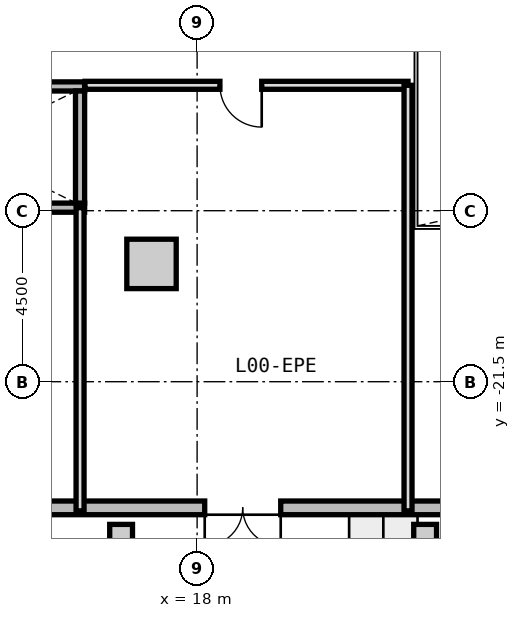
"""IFC4 building model, lengths in metres.
Left out: names, types, materials, properties, quantities, classifications, styles, units other than length and angle.
Written with IfcOpenShell. Run it as: python <this file> out.ifc"""

import sys

from ifc_helpers import new_model, si_unit, direction, frame, frame_2d, origin, origin_2d, place, context, subcontext, project, spatial, rectangle, extrude, source, transform, mapped, element, fill, save


model = new_model("IFC4")
c1 = context("Model", 3, precision=1e-05, world=origin(), true_north=direction((0.0, 1.0)))
c2 = subcontext(c1, "Body", "Model", "MODEL_VIEW")
j1 = project(units=[si_unit("LENGTHUNIT", "METRE"), si_unit("PLANEANGLEUNIT", "RADIAN")], contexts=[c1])
p1 = place(None, origin())
s1 = spatial("IfcSite", under=j1, at=p1, CompositionType="ELEMENT")
p2 = place(p1, origin())
s2 = spatial("IfcBuilding", under=s1, at=p2, CompositionType="ELEMENT")
p3 = place(p2, origin())
s3 = spatial("IfcBuildingStorey", under=s2, at=p3, CompositionType="ELEMENT", Elevation=0.0)
m1 = source(origin(), c2, "Body", "SweptSolid", [
    extrude(rectangle(XDim=1.3, YDim=1.3, at=origin_2d()), origin(), (0.0, 0.0, 1.0), 4.2),
])
p4 = place(p3, frame((16.8, -18.4, 0.0), z_axis=(0.0, 0.0, 1.0), x_axis=(1.0, 0.0, 0.0)))
e1 = element("IfcColumn", 1, at=p4, inside=s3, PredefinedType="COLUMN", context=c2, shape_type="MappedRepresentation", body=[
    mapped(m1, transform((0.0, 0.0, 0.0), x_axis=(1.0, 0.0, 0.0), y_axis=(0.0, 1.0, 0.0), z_axis=(0.0, 0.0, 1.0), scale=1.0)),
])
m2 = source(origin(), c2, "Body", "SweptSolid", [
    extrude(rectangle(XDim=0.6, YDim=0.45, at=origin_2d()), origin(), (0.0, 0.0, 1.0), 4.2),
])
for number, where, z_axis, x_axis in (
    (2, (16.0, -25.48, 0.0), (0.0, 0.0, 1.0), (1.0, 0.0, 0.0)),
    (3, (24.0, -25.48, 0.0), (0.0, 0.0, 1.0), (1.0, 0.0, 0.0)),
):
    element("IfcColumn", number, at=place(p3, frame(where, z_axis=z_axis, x_axis=x_axis)), inside=s3, PredefinedType="PILASTER", context=c2, shape_type="MappedRepresentation", body=[
        mapped(m2, transform((0.0, 0.0, 0.0), x_axis=(1.0, 0.0, 0.0), y_axis=(0.0, 1.0, 0.0), z_axis=(0.0, 0.0, 1.0), scale=1.0)),
    ])
m3 = source(origin(), c2, "Body", "SweptSolid", [
    extrude(rectangle(XDim=108.64, YDim=0.36, at=frame_2d((54.32, 0.0))), origin(), (0.0, 0.0, 1.0), 3.88),
])
p5 = place(p3, frame((54.32, -24.82, 0.0), z_axis=(0.0, 0.0, 1.0), x_axis=(-1.0, 0.0, 0.0)))
e4 = element("IfcWall", 4, at=p5, inside=s3, PredefinedType="SOLIDWALL", context=c2, shape_type="MappedRepresentation", body=[
    mapped(m3, transform((0.0, 0.0, 0.0), x_axis=(1.0, 0.0, 0.0), y_axis=(0.0, 1.0, 0.0), z_axis=(0.0, 0.0, 1.0), scale=1.0)),
])
p6 = place(p5, frame((50.52, 0.0, 0.0)))
e5 = element("IfcOpeningElement", 5, at=p6, cuts=e4, PredefinedType="OPENING", context=c2, shape_type="SweptSolid", body=[
    extrude(rectangle(XDim=2.4, YDim=2.6, at=frame_2d((1.2, 1.3))), frame((0.0, 0.19, 0.0), z_axis=(0.0, -1.0, 0.0), x_axis=(1.0, 0.0, 0.0)), (0.0, 0.0, 1.0), 0.38),
])
p7 = place(p5, frame((57.12, 0.0, 0.0)))
e6 = element("IfcOpeningElement", 6, at=p7, cuts=e4, PredefinedType="OPENING", context=c2, shape_type="SweptSolid", body=[
    extrude(rectangle(XDim=2.0, YDim=2.3, at=frame_2d((1.0, 1.15))), frame((0.0, 0.19, 0.0), z_axis=(0.0, -1.0, 0.0), x_axis=(1.0, 0.0, 0.0)), (0.0, 0.0, 1.0), 0.38),
])
p8 = place(p5, frame((42.52, 0.0, 0.0)))
e7 = element("IfcOpeningElement", 7, at=p8, cuts=e4, PredefinedType="OPENING", context=c2, shape_type="SweptSolid", body=[
    extrude(rectangle(XDim=2.0, YDim=2.3, at=frame_2d((1.0, 1.15))), frame((0.0, 0.19, 0.0), z_axis=(0.0, -1.0, 0.0), x_axis=(1.0, 0.0, 0.0)), (0.0, 0.0, 1.0), 0.38),
])
p9 = place(p5, frame((64.12, 0.0, 0.0)))
e8 = element("IfcOpeningElement", 8, at=p9, cuts=e4, PredefinedType="OPENING", context=c2, shape_type="SweptSolid", body=[
    extrude(rectangle(XDim=2.0, YDim=2.3, at=frame_2d((1.0, 1.15))), frame((0.0, 0.19, 0.0), z_axis=(0.0, -1.0, 0.0), x_axis=(1.0, 0.0, 0.0)), (0.0, 0.0, 1.0), 0.38),
])
p10 = place(p5, frame((75.32, 0.0, 0.0)))
e9 = element("IfcOpeningElement", 9, at=p10, cuts=e4, PredefinedType="OPENING", context=c2, shape_type="SweptSolid", body=[
    extrude(rectangle(XDim=2.0, YDim=2.3, at=frame_2d((1.0, 1.15))), frame((0.0, 0.19, 0.0), z_axis=(0.0, -1.0, 0.0), x_axis=(1.0, 0.0, 0.0)), (0.0, 0.0, 1.0), 0.38),
])
p11 = place(p5, frame((34.12, 0.0, 0.0)))
e10 = element("IfcOpeningElement", 10, at=p11, cuts=e4, PredefinedType="OPENING", context=c2, shape_type="SweptSolid", body=[
    extrude(rectangle(XDim=2.0, YDim=2.3, at=frame_2d((1.0, 1.15))), frame((0.0, 0.19, 0.0), z_axis=(0.0, -1.0, 0.0), x_axis=(1.0, 0.0, 0.0)), (0.0, 0.0, 1.0), 0.38),
])
m4 = source(origin(), c2, "Body", "SweptSolid", [
    extrude(rectangle(XDim=7.88, YDim=0.24, at=frame_2d((3.94, 0.0))), origin(), (0.0, 0.0, 1.0), 3.88),
])
p12 = place(p3, frame((7.16, -13.73, 0.0), z_axis=(0.0, 0.0, 1.0), x_axis=(1.0, 0.0, 0.0)))
e11 = element("IfcWall", 11, at=p12, inside=s3, PredefinedType="PARTITIONING", context=c2, shape_type="MappedRepresentation", body=[
    mapped(m4, transform((0.0, 0.0, 0.0), x_axis=(1.0, 0.0, 0.0), y_axis=(0.0, 1.0, 0.0), z_axis=(0.0, 0.0, 1.0), scale=1.0)),
])
p13 = place(p12, frame((0.37, 0.0, 0.0)))
e12 = element("IfcOpeningElement", 12, at=p13, cuts=e11, PredefinedType="OPENING", context=c2, shape_type="SweptSolid", body=[
    extrude(rectangle(XDim=1.1, YDim=2.15, at=frame_2d((0.55, 1.075))), frame((0.0, 0.13, 0.0), z_axis=(0.0, -1.0, 0.0), x_axis=(1.0, 0.0, 0.0)), (0.0, 0.0, 1.0), 0.26),
])
p14 = place(p3, frame((7.16, -16.92, 0.0), z_axis=(0.0, 0.0, 1.0), x_axis=(1.0, 0.0, 0.0)))
e13 = element("IfcWall", 13, at=p14, inside=s3, PredefinedType="PARTITIONING", context=c2, shape_type="MappedRepresentation", body=[
    mapped(m4, transform((0.0, 0.0, 0.0), x_axis=(1.0, 0.0, 0.0), y_axis=(0.0, 1.0, 0.0), z_axis=(0.0, 0.0, 1.0), scale=1.0)),
])
p15 = place(p14, frame((0.37, 0.0, 0.0)))
e14 = element("IfcOpeningElement", 14, at=p15, cuts=e13, PredefinedType="OPENING", context=c2, shape_type="SweptSolid", body=[
    extrude(rectangle(XDim=1.1, YDim=2.15, at=frame_2d((0.55, 1.075))), frame((0.0, 0.13, 0.0), z_axis=(0.0, -1.0, 0.0), x_axis=(1.0, 0.0, 0.0)), (0.0, 0.0, 1.0), 0.26),
])
m5 = source(origin(), c2, "Body", "SweptSolid", [
    extrude(rectangle(XDim=2.95, YDim=0.24, at=frame_2d((1.475, 0.0))), origin(), (0.0, 0.0, 1.0), 3.88),
])
p16 = place(p3, frame((14.92, -16.8, 0.0), z_axis=(0.0, 0.0, 1.0), x_axis=(0.0, 1.0, 0.0)))
e15 = element("IfcWall", 15, at=p16, inside=s3, PredefinedType="PARTITIONING", context=c2, shape_type="MappedRepresentation", body=[
    mapped(m5, transform((0.0, 0.0, 0.0), x_axis=(1.0, 0.0, 0.0), y_axis=(0.0, 1.0, 0.0), z_axis=(0.0, 0.0, 1.0), scale=1.0)),
])
m6 = source(origin(), c2, "Body", "SweptSolid", [
    extrude(rectangle(XDim=7.98, YDim=0.21, at=frame_2d((3.99, 0.0))), origin(), (0.0, 0.0, 1.0), 3.865),
])
p17 = place(p3, frame((14.92, -24.9, 0.0), z_axis=(0.0, 0.0, 1.0), x_axis=(0.0, 1.0, 0.0)))
e16 = element("IfcWall", 16, at=p17, inside=s3, PredefinedType="PARTITIONING", context=c2, shape_type="MappedRepresentation", body=[
    mapped(m6, transform((0.0, 0.0, 0.0), x_axis=(1.0, 0.0, 0.0), y_axis=(0.0, 1.0, 0.0), z_axis=(0.0, 0.0, 1.0), scale=1.0)),
])
m7 = source(origin(), c2, "Body", "SweptSolid", [
    extrude(rectangle(XDim=8.5, YDim=0.21, at=frame_2d((4.25, 0.0))), origin(), (0.0, 0.0, 1.0), 3.865),
])
p18 = place(p3, frame((15.05, -13.7, 0.0), z_axis=(0.0, 0.0, 1.0), x_axis=(1.0, 0.0, 0.0)))
e17 = element("IfcWall", 17, at=p18, inside=s3, PredefinedType="PARTITIONING", context=c2, shape_type="MappedRepresentation", body=[
    mapped(m7, transform((0.0, 0.0, 0.0), x_axis=(1.0, 0.0, 0.0), y_axis=(0.0, 1.0, 0.0), z_axis=(0.0, 0.0, 1.0), scale=1.0)),
])
p19 = place(p18, frame((3.55, 0.0, 0.0)))
e18 = element("IfcOpeningElement", 18, at=p19, cuts=e17, PredefinedType="OPENING", context=c2, shape_type="SweptSolid", body=[
    extrude(rectangle(XDim=1.1, YDim=2.15, at=frame_2d((0.55, 1.075))), frame((0.0, 0.115, 0.0), z_axis=(0.0, -1.0, 0.0), x_axis=(1.0, 0.0, 0.0)), (0.0, 0.0, 1.0), 0.23),
])
m8 = source(origin(), c2, "Body", "SweptSolid", [
    extrude(rectangle(XDim=11.2, YDim=0.21, at=frame_2d((5.6, 0.0))), origin(), (0.0, 0.0, 1.0), 3.865),
])
p20 = place(p3, frame((23.55, -24.9, 0.0), z_axis=(0.0, 0.0, 1.0), x_axis=(0.0, 1.0, 0.0)))
e19 = element("IfcWall", 19, at=p20, inside=s3, PredefinedType="PARTITIONING", context=c2, shape_type="MappedRepresentation", body=[
    mapped(m8, transform((0.0, 0.0, 0.0), x_axis=(1.0, 0.0, 0.0), y_axis=(0.0, 1.0, 0.0), z_axis=(0.0, 0.0, 1.0), scale=1.0)),
])
m9 = source(origin(), c2, "Body", "SweptSolid", [
    extrude(rectangle(XDim=2.0, YDim=2.3, at=frame_2d((1.0, 1.15))), frame((0.0, 0.025, 0.0), z_axis=(0.0, -1.0, 0.0), x_axis=(1.0, 0.0, 0.0)), (0.0, 0.0, 1.0), 0.05),
])
p21 = place(p11, origin())
e20 = element("IfcDoor", 20, at=p21, inside=s3, OperationType="DOUBLE_DOOR_SINGLE_SWING", PredefinedType="DOOR", context=c2, shape_type="MappedRepresentation", body=[
    mapped(m9, transform((0.0, 0.0, 0.0), x_axis=(1.0, 0.0, 0.0), y_axis=(0.0, 1.0, 0.0), z_axis=(0.0, 0.0, 1.0), scale=1.0)),
])
fill(e10, e20)
m10 = source(origin(), c2, "Body", "SweptSolid", [
    extrude(rectangle(XDim=1.1, YDim=2.15, at=frame_2d((0.55, 1.075))), frame((0.0, 0.025, 0.0), z_axis=(0.0, -1.0, 0.0), x_axis=(1.0, 0.0, 0.0)), (0.0, 0.0, 1.0), 0.05),
])
p22 = place(p19, frame((1.1, 0.0, 0.0), z_axis=(0.0, 0.0, 1.0), x_axis=(-1.0, 0.0, 0.0)))
e21 = element("IfcDoor", 21, at=p22, inside=s3, OperationType="SINGLE_SWING_LEFT", PredefinedType="DOOR", context=c2, shape_type="MappedRepresentation", body=[
    mapped(m10, transform((0.0, 0.0, 0.0), x_axis=(1.0, 0.0, 0.0), y_axis=(0.0, 1.0, 0.0), z_axis=(0.0, 0.0, 1.0), scale=1.0)),
])
fill(e18, e21)
save(model, sys.argv[1])
